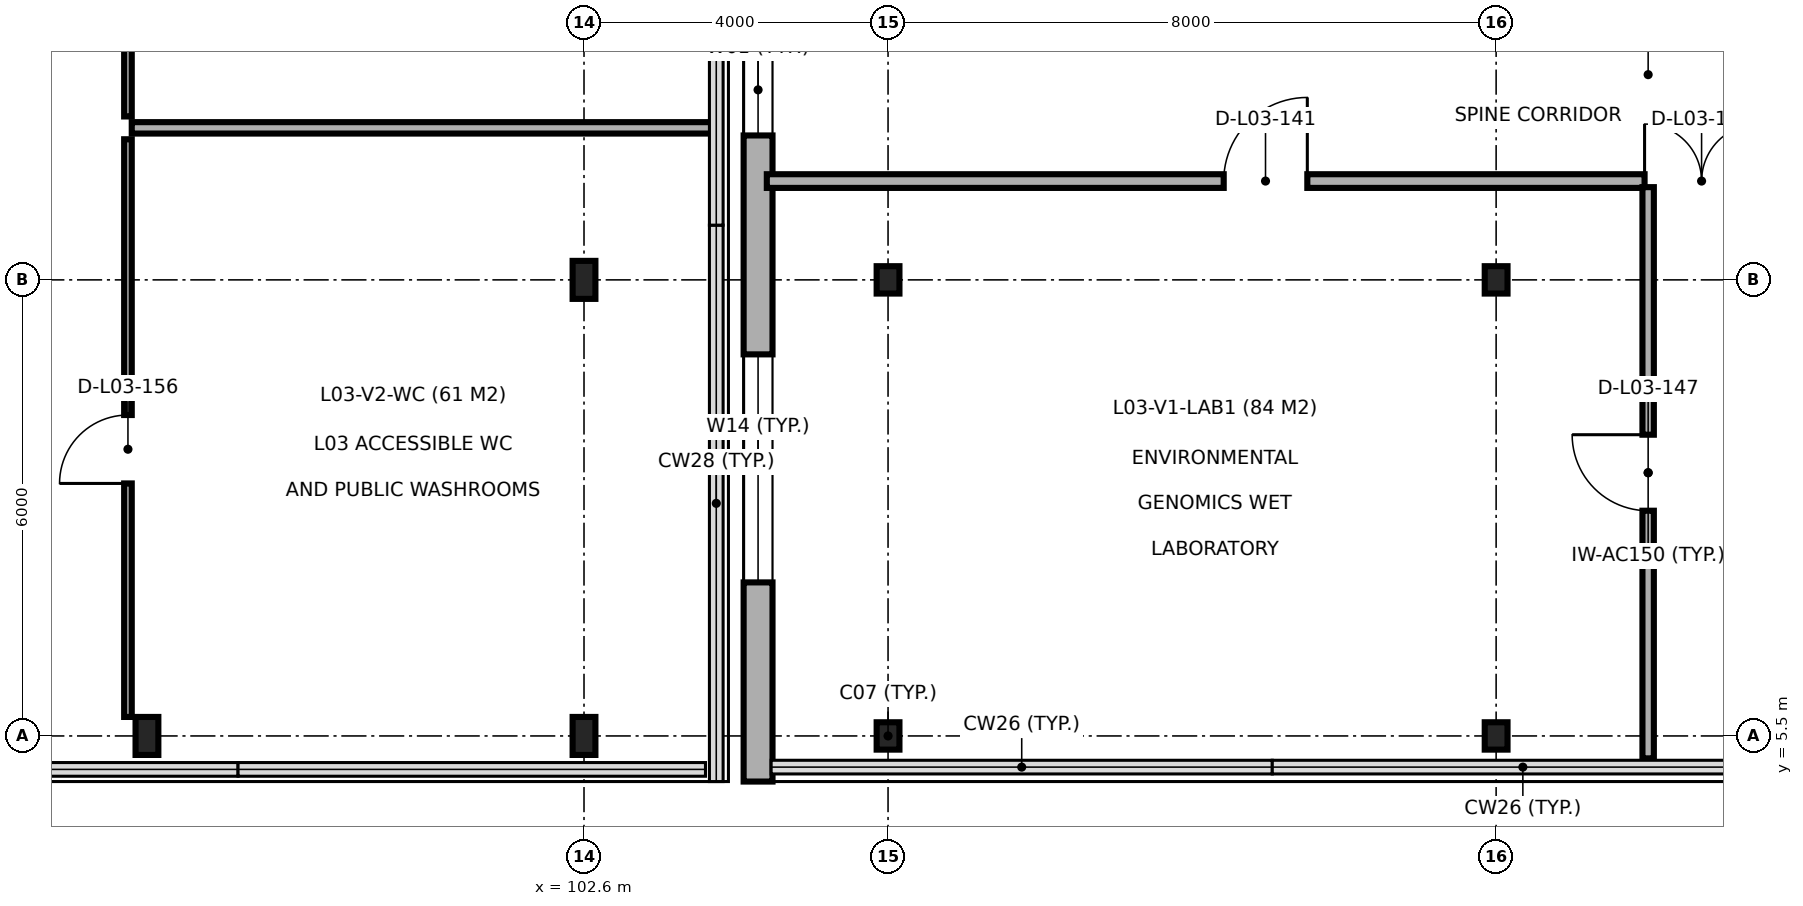
"""IFC4 building model, lengths in metres.
Left out: names, types, materials, properties, quantities, classifications, styles, units other than length and angle.
Written with IfcOpenShell. Run it as: python <this file> out.ifc"""

import sys

from ifc_helpers import new_model, si_unit, direction, frame, frame_2d, origin, origin_2d, place, context, subcontext, project, spatial, rectangle, i_section, extrude, element, fill, save


model = new_model("IFC4")
c1 = context("Model", 3, precision=1e-05, world=origin(), true_north=direction((0.0, 1.0)))
c2 = subcontext(c1, "Body", "Model", "MODEL_VIEW")
j1 = project(units=[si_unit("LENGTHUNIT", "METRE"), si_unit("PLANEANGLEUNIT", "RADIAN")], contexts=[c1])
p1 = place(None, origin())
s1 = spatial("IfcSite", under=j1, at=p1, CompositionType="ELEMENT")
p2 = place(p1, origin())
s2 = spatial("IfcBuilding", under=s1, at=p2, CompositionType="ELEMENT")
p3 = place(p2, frame((0.0, 0.0, 13.8)))
s3 = spatial("IfcBuildingStorey", under=s2, at=p3, CompositionType="ELEMENT", Elevation=13.8)
p4 = place(p3, frame((96.85, 5.5, 0.0), z_axis=(0.0, 0.0, 1.0), x_axis=(1.0, 0.0, 0.0)))
e1 = element("IfcColumn", 1, at=p4, inside=s3, PredefinedType="COLUMN", context=c2, shape_type="SweptSolid", body=[
    extrude(i_section(OverallWidth=0.3, OverallDepth=0.5, WebThickness=0.014, FlangeThickness=0.028, FilletRadius=0.027, at=origin_2d()), origin(), (0.0, 0.0, 1.0), 6.338),
])
p5 = place(p3, frame((102.6, 5.5, 0.0), z_axis=(0.0, 0.0, 1.0), x_axis=(1.0, 0.0, 0.0)))
e2 = element("IfcColumn", 2, at=p5, inside=s3, PredefinedType="COLUMN", context=c2, shape_type="SweptSolid", body=[
    extrude(i_section(OverallWidth=0.3, OverallDepth=0.5, WebThickness=0.014, FlangeThickness=0.028, FilletRadius=0.027, at=origin_2d()), origin(), (0.0, 0.0, 1.0), 4.578),
])
p6 = place(p3, frame((102.6, 11.5, 0.0), z_axis=(0.0, 0.0, 1.0), x_axis=(1.0, 0.0, 0.0)))
e3 = element("IfcColumn", 3, at=p6, inside=s3, PredefinedType="COLUMN", context=c2, shape_type="SweptSolid", body=[
    extrude(i_section(OverallWidth=0.3, OverallDepth=0.5, WebThickness=0.014, FlangeThickness=0.028, FilletRadius=0.027, at=origin_2d()), origin(), (0.0, 0.0, 1.0), 5.508),
])
for number, where, z_axis, x_axis in (
    (4, (106.6, 5.5, 0.0), (0.0, 0.0, 1.0), (1.0, 0.0, 0.0)),
    (5, (106.6, 11.5, 0.0), (0.0, 0.0, 1.0), (1.0, 0.0, 0.0)),
    (6, (114.6, 5.5, 0.0), (0.0, 0.0, 1.0), (1.0, 0.0, 0.0)),
    (7, (114.6, 11.5, 0.0), (0.0, 0.0, 1.0), (1.0, 0.0, 0.0)),
):
    element("IfcColumn", number, at=place(p3, frame(where, z_axis=z_axis, x_axis=x_axis)), inside=s3, PredefinedType="COLUMN", context=c2, shape_type="SweptSolid", body=[
        extrude(i_section(OverallWidth=0.3, OverallDepth=0.36, WebThickness=0.012, FlangeThickness=0.022, FilletRadius=0.027, at=origin_2d()), origin(), (0.0, 0.0, 1.0), 4.5),
    ])
p7 = place(p3, frame((104.89, 23.5, 0.0), z_axis=(0.0, 0.0, 1.0), x_axis=(0.0, -1.0, 0.0)))
e8 = element("IfcWall", 8, at=p7, inside=s3, PredefinedType="SOLIDWALL", context=c2, shape_type="SweptSolid", body=[
    extrude(rectangle(XDim=18.6, YDim=0.38, at=frame_2d((9.3, 0.0))), origin(), (0.0, 0.0, 1.0), 4.24),
])
p8 = place(p7, frame((2.07, 0.0, 0.9)))
e9 = element("IfcOpeningElement", 9, at=p8, cuts=e8, PredefinedType="OPENING", context=c2, shape_type="SweptSolid", body=[
    extrude(rectangle(XDim=1.2, YDim=2.1, at=frame_2d((0.6, 1.05))), frame((0.0, 0.2, 0.0), z_axis=(0.0, -1.0, 0.0), x_axis=(1.0, 0.0, 0.0)), (0.0, 0.0, 1.0), 0.4),
])
p9 = place(p7, frame((5.75, 0.0, 0.9)))
e10 = element("IfcOpeningElement", 10, at=p9, cuts=e8, PredefinedType="OPENING", context=c2, shape_type="SweptSolid", body=[
    extrude(rectangle(XDim=1.8, YDim=2.1, at=frame_2d((0.9, 1.05))), frame((0.0, 0.2, 0.0), z_axis=(0.0, -1.0, 0.0), x_axis=(1.0, 0.0, 0.0)), (0.0, 0.0, 1.0), 0.4),
])
p10 = place(p7, frame((8.9, 0.0, 0.9)))
e11 = element("IfcOpeningElement", 11, at=p10, cuts=e8, PredefinedType="OPENING", context=c2, shape_type="SweptSolid", body=[
    extrude(rectangle(XDim=1.2, YDim=1.8, at=frame_2d((0.6, 0.9))), frame((0.0, 0.2, 0.0), z_axis=(0.0, -1.0, 0.0), x_axis=(1.0, 0.0, 0.0)), (0.0, 0.0, 1.0), 0.4),
])
p11 = place(p7, frame((12.98, 0.0, 0.9)))
e12 = element("IfcOpeningElement", 12, at=p11, cuts=e8, PredefinedType="OPENING", context=c2, shape_type="SweptSolid", body=[
    extrude(rectangle(XDim=3.0, YDim=2.1, at=frame_2d((1.5, 1.05))), frame((0.0, 0.2, 0.0), z_axis=(0.0, -1.0, 0.0), x_axis=(1.0, 0.0, 0.0)), (0.0, 0.0, 1.0), 0.4),
])
p12 = place(p3, frame((105.005, 12.8, 0.0), z_axis=(0.0, 0.0, 1.0), x_axis=(1.0, 0.0, 0.0)))
e13 = element("IfcWall", 13, at=p12, inside=s3, PredefinedType="PARTITIONING", context=c2, shape_type="SweptSolid", body=[
    extrude(rectangle(XDim=34.495, YDim=0.18, at=frame_2d((17.248, 0.0))), origin(), (0.0, 0.0, 1.0), 4.25),
])
p13 = place(p12, frame((6.011, 0.0, 0.0)))
e14 = element("IfcOpeningElement", 14, at=p13, cuts=e13, PredefinedType="OPENING", context=c2, shape_type="SweptSolid", body=[
    extrude(rectangle(XDim=1.1, YDim=2.15, at=frame_2d((0.55, 1.075))), frame((0.0, 0.1, 0.0), z_axis=(0.0, -1.0, 0.0), x_axis=(1.0, 0.0, 0.0)), (0.0, 0.0, 1.0), 0.2),
])
p14 = place(p12, frame((11.548, 0.0, 0.0)))
e15 = element("IfcOpeningElement", 15, at=p14, cuts=e13, PredefinedType="OPENING", context=c2, shape_type="SweptSolid", body=[
    extrude(rectangle(XDim=1.5, YDim=2.2, at=frame_2d((0.75, 1.1))), frame((0.0, 0.1, 0.0), z_axis=(0.0, -1.0, 0.0), x_axis=(1.0, 0.0, 0.0)), (0.0, 0.0, 1.0), 0.2),
])
p15 = place(p12, frame((27.548, 0.0, 0.0)))
e16 = element("IfcOpeningElement", 16, at=p15, cuts=e13, PredefinedType="OPENING", context=c2, shape_type="SweptSolid", body=[
    extrude(rectangle(XDim=0.9, YDim=2.1, at=frame_2d((0.45, 1.05))), frame((0.0, 0.1, 0.0), z_axis=(0.0, -1.0, 0.0), x_axis=(1.0, 0.0, 0.0)), (0.0, 0.0, 1.0), 0.2),
])
p16 = place(p3, frame((116.6, 5.205, 0.0), z_axis=(0.0, 0.0, 1.0), x_axis=(0.0, 1.0, 0.0)))
e17 = element("IfcWall", 17, at=p16, inside=s3, PredefinedType="PARTITIONING", context=c2, shape_type="SweptSolid", body=[
    extrude(rectangle(XDim=7.515, YDim=0.15, at=frame_2d((3.757, 0.0))), origin(), (0.0, 0.0, 1.0), 4.25),
])
p17 = place(p16, frame((3.258, 0.0, 0.0)))
e18 = element("IfcOpeningElement", 18, at=p17, cuts=e17, PredefinedType="OPENING", context=c2, shape_type="SweptSolid", body=[
    extrude(rectangle(XDim=1.0, YDim=2.15, at=frame_2d((0.5, 1.075))), frame((0.0, 0.085, 0.0), z_axis=(0.0, -1.0, 0.0), x_axis=(1.0, 0.0, 0.0)), (0.0, 0.0, 1.0), 0.17),
])
p18 = place(p3, frame((96.65, 13.5, 0.0), z_axis=(0.0, 0.0, 1.0), x_axis=(1.0, 0.0, 0.0)))
e19 = element("IfcWall", 19, at=p18, inside=s3, PredefinedType="PARTITIONING", context=c2, shape_type="SweptSolid", body=[
    extrude(rectangle(XDim=7.63, YDim=0.15, at=frame_2d((3.815, 0.0))), origin(), (0.0, 0.0, 1.0), 4.25),
])
p19 = place(p3, frame((96.6, 5.75, 0.0), z_axis=(0.0, 0.0, 1.0), x_axis=(0.0, 1.0, 0.0)))
e20 = element("IfcWall", 20, at=p19, inside=s3, PredefinedType="PARTITIONING", context=c2, shape_type="SweptSolid", body=[
    extrude(rectangle(XDim=7.6, YDim=0.1, at=frame_2d((3.8, 0.0))), origin(), (0.0, 0.0, 1.0), 4.25),
])
p20 = place(p19, frame((3.072, 0.0, 0.0)))
e21 = element("IfcOpeningElement", 21, at=p20, cuts=e20, PredefinedType="OPENING", context=c2, shape_type="SweptSolid", body=[
    extrude(rectangle(XDim=0.9, YDim=2.1, at=frame_2d((0.45, 1.05))), frame((0.0, 0.06, 0.0), z_axis=(0.0, -1.0, 0.0), x_axis=(1.0, 0.0, 0.0)), (0.0, 0.0, 1.0), 0.12),
])
p21 = place(p3, frame((96.6, 13.65, 0.0), z_axis=(0.0, 0.0, 1.0), x_axis=(0.0, 1.0, 0.0)))
e22 = element("IfcWall", 22, at=p21, inside=s3, PredefinedType="PARTITIONING", context=c2, shape_type="SweptSolid", body=[
    extrude(rectangle(XDim=10.2, YDim=0.1, at=frame_2d((5.1, 0.0))), origin(), (0.0, 0.0, 1.0), 4.25),
])
p22 = place(p21, frame((4.65, 0.0, 0.0)))
e23 = element("IfcOpeningElement", 23, at=p22, cuts=e22, PredefinedType="OPENING", context=c2, shape_type="SweptSolid", body=[
    extrude(rectangle(XDim=0.9, YDim=2.1, at=frame_2d((0.45, 1.05))), frame((0.0, 0.06, 0.0), z_axis=(0.0, -1.0, 0.0), x_axis=(1.0, 0.0, 0.0)), (0.0, 0.0, 1.0), 0.12),
])
p23 = place(p10, origin())
e24 = element("IfcWindow", 24, at=p23, inside=s3, PartitioningType="SINGLE_PANEL", PredefinedType="WINDOW", context=c2, shape_type="SweptSolid", body=[
    extrude(rectangle(XDim=1.2, YDim=1.8, at=frame_2d((0.6, 0.9))), frame((0.0, 0.03, 0.0), z_axis=(0.0, -1.0, 0.0), x_axis=(1.0, 0.0, 0.0)), (0.0, 0.0, 1.0), 0.06),
])
fill(e11, e24)
p24 = place(p11, origin())
e25 = element("IfcWindow", 25, at=p24, inside=s3, PartitioningType="SINGLE_PANEL", PredefinedType="WINDOW", context=c2, shape_type="SweptSolid", body=[
    extrude(rectangle(XDim=3.0, YDim=2.1, at=frame_2d((1.5, 1.05))), frame((0.0, 0.03, 0.0), z_axis=(0.0, -1.0, 0.0), x_axis=(1.0, 0.0, 0.0)), (0.0, 0.0, 1.0), 0.06),
])
fill(e12, e25)
p25 = place(p13, origin())
e26 = element("IfcDoor", 26, at=p25, inside=s3, OperationType="SINGLE_SWING_RIGHT", PredefinedType="DOOR", context=c2, shape_type="SweptSolid", body=[
    extrude(rectangle(XDim=1.1, YDim=2.15, at=frame_2d((0.55, 1.075))), frame((0.0, 0.025, 0.0), z_axis=(0.0, -1.0, 0.0), x_axis=(1.0, 0.0, 0.0)), (0.0, 0.0, 1.0), 0.05),
])
fill(e14, e26)
p26 = place(p14, origin())
e27 = element("IfcDoor", 27, at=p26, inside=s3, OperationType="DOUBLE_DOOR_SINGLE_SWING", PredefinedType="DOOR", context=c2, shape_type="SweptSolid", body=[
    extrude(rectangle(XDim=1.5, YDim=2.2, at=frame_2d((0.75, 1.1))), frame((0.0, 0.025, 0.0), z_axis=(0.0, -1.0, 0.0), x_axis=(1.0, 0.0, 0.0)), (0.0, 0.0, 1.0), 0.05),
])
fill(e15, e27)
p27 = place(p17, origin())
e28 = element("IfcDoor", 28, at=p27, inside=s3, OperationType="SINGLE_SWING_RIGHT", PredefinedType="DOOR", context=c2, shape_type="SweptSolid", body=[
    extrude(rectangle(XDim=1.0, YDim=2.15, at=frame_2d((0.5, 1.075))), frame((0.0, 0.025, 0.0), z_axis=(0.0, -1.0, 0.0), x_axis=(1.0, 0.0, 0.0)), (0.0, 0.0, 1.0), 0.05),
])
fill(e18, e28)
p28 = place(p20, origin())
e29 = element("IfcDoor", 29, at=p28, inside=s3, OperationType="SINGLE_SWING_LEFT", PredefinedType="DOOR", context=c2, shape_type="SweptSolid", body=[
    extrude(rectangle(XDim=0.9, YDim=2.1, at=frame_2d((0.45, 1.05))), frame((0.0, 0.025, 0.0), z_axis=(0.0, -1.0, 0.0), x_axis=(1.0, 0.0, 0.0)), (0.0, 0.0, 1.0), 0.05),
])
fill(e21, e29)
save(model, sys.argv[1])
